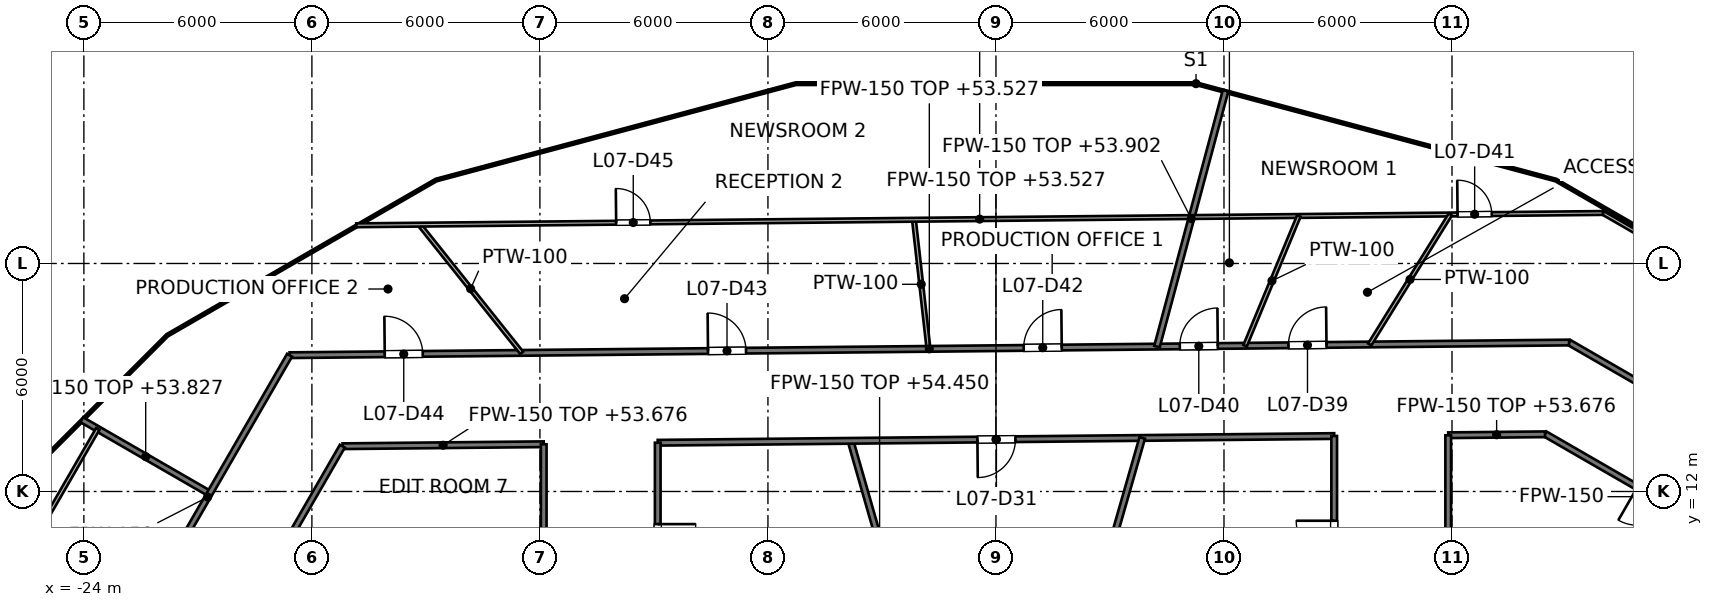
"""IFC4 building model, lengths in metres.
Left out: names, types, materials, properties, quantities, classifications, styles, units other than length and angle.
Written with IfcOpenShell. Run it as: python <this file> out.ifc"""

import sys

from ifc_helpers import new_model, si_unit, direction, frame, frame_2d, origin, place, context, subcontext, project, spatial, rectangle, extrude, element, fill, save


model = new_model("IFC4")
c1 = context("Model", 3, precision=1e-05, world=origin(), true_north=direction((0.0, 1.0)))
c2 = subcontext(c1, "Body", "Model", "MODEL_VIEW")
j1 = project(units=[si_unit("LENGTHUNIT", "METRE"), si_unit("PLANEANGLEUNIT", "RADIAN")], contexts=[c1])
p1 = place(None, origin())
s1 = spatial("IfcSite", under=j1, at=p1, CompositionType="ELEMENT")
p2 = place(p1, origin())
s2 = spatial("IfcBuilding", under=s1, at=p2, CompositionType="ELEMENT")
p3 = place(p2, frame((0.0, 0.0, 50.4)))
s3 = spatial("IfcBuildingStorey", under=s2, at=p3, CompositionType="ELEMENT", Elevation=50.4)
p4 = place(p3, frame((-3.827, 13.333, 0.0), z_axis=(0.0, 0.0, 1.0), x_axis=(0.275935525478, -0.961176147113, 0.0)))
e1 = element("IfcWall", 1, at=p4, inside=s3, PredefinedType="PARTITIONING", context=c2, shape_type="SweptSolid", body=[
    extrude(rectangle(XDim=5.548, YDim=0.15, at=frame_2d((2.774, 0.0))), origin(), (0.0, 0.0, 1.0), 4.05),
])
p5 = place(p3, frame((-24.056, 13.889, 0.0), z_axis=(0.0, 0.0, 1.0), x_axis=(0.865926134655, -0.500171899772, 0.0)))
e2 = element("IfcWall", 2, at=p5, inside=s3, PredefinedType="PARTITIONING", context=c2, shape_type="SweptSolid", body=[
    extrude(rectangle(XDim=3.887, YDim=0.15, at=frame_2d((1.943, 0.0))), origin(), (0.0, 0.0, 1.0), 3.427),
])
p6 = place(p3, frame((14.448, 13.515, 0.0), z_axis=(0.0, 0.0, 1.0), x_axis=(0.86594975937, -0.500130997087, 0.0)))
e3 = element("IfcWall", 3, at=p6, inside=s3, PredefinedType="PARTITIONING", context=c2, shape_type="SweptSolid", body=[
    extrude(rectangle(XDim=6.604, YDim=0.15, at=frame_2d((3.302, 0.0))), origin(), (0.0, 0.0, 1.0), 3.195),
])
p7 = place(p6, frame((2.805, 0.0, 0.0)))
e4 = element("IfcOpeningElement", 4, at=p7, cuts=e3, PredefinedType="OPENING", context=c2, shape_type="SweptSolid", body=[
    extrude(rectangle(XDim=1.0, YDim=2.1, at=frame_2d((0.5, 1.05))), frame((0.0, 0.075, 0.0), z_axis=(0.0, -1.0, 0.0), x_axis=(1.0, 0.0, 0.0)), (0.0, 0.0, 1.0), 0.15),
])
p8 = place(p3, frame((15.08, 15.921, 0.0), z_axis=(0.0, 0.0, 1.0), x_axis=(0.865938192663, -0.500151023679, 0.0)))
e5 = element("IfcWall", 5, at=p8, inside=s3, PredefinedType="PARTITIONING", context=c2, shape_type="SweptSolid", body=[
    extrude(rectangle(XDim=8.613, YDim=0.15, at=frame_2d((4.306, 0.0))), origin(), (0.0, 0.0, 1.0), 3.195),
])
p9 = place(p8, frame((3.21, 0.0, 0.0)))
e6 = element("IfcOpeningElement", 6, at=p9, cuts=e5, PredefinedType="OPENING", context=c2, shape_type="SweptSolid", body=[
    extrude(rectangle(XDim=1.2, YDim=2.1, at=frame_2d((0.6, 1.05))), frame((0.0, 0.075, 0.0), z_axis=(0.0, -1.0, 0.0), x_axis=(1.0, 0.0, 0.0)), (0.0, 0.0, 1.0), 0.15),
])
p10 = place(p3, frame((-17.194, 13.191, 0.0), z_axis=(0.0, 0.0, 1.0), x_axis=(0.999950853109, 0.009914200296, 0.0)))
e7 = element("IfcWall", 7, at=p10, inside=s3, PredefinedType="PARTITIONING", context=c2, shape_type="SweptSolid", body=[
    extrude(rectangle(XDim=5.294, YDim=0.15, at=frame_2d((2.647, 0.0))), origin(), (0.0, 0.0, 1.0), 3.276),
])
p11 = place(p3, frame((-8.9, 13.282, 0.0), z_axis=(0.0, 0.0, 1.0), x_axis=(0.999950834077, 0.009916119672, 0.0)))
e8 = element("IfcWall", 8, at=p11, inside=s3, PredefinedType="PARTITIONING", context=c2, shape_type="SweptSolid", body=[
    extrude(rectangle(XDim=17.801, YDim=0.15, at=frame_2d((8.9, 0.0))), origin(), (0.0, 0.0, 1.0), 3.127),
])
p12 = place(p11, frame((8.412, 0.0, 0.0)))
e9 = element("IfcOpeningElement", 9, at=p12, cuts=e8, PredefinedType="OPENING", context=c2, shape_type="SweptSolid", body=[
    extrude(rectangle(XDim=1.0, YDim=2.1, at=frame_2d((0.5, 1.05))), frame((0.0, 0.075, 0.0), z_axis=(0.0, -1.0, 0.0), x_axis=(1.0, 0.0, 0.0)), (0.0, 0.0, 1.0), 0.15),
])
p13 = place(p3, frame((11.9, 13.48, 0.0), z_axis=(0.0, 0.0, 1.0), x_axis=(0.999950357576, 0.009964054536, 0.0)))
e10 = element("IfcWall", 10, at=p13, inside=s3, PredefinedType="PARTITIONING", context=c2, shape_type="SweptSolid", body=[
    extrude(rectangle(XDim=2.548, YDim=0.15, at=frame_2d((1.274, 0.0))), origin(), (0.0, 0.0, 1.0), 3.276),
])
p14 = place(p3, frame((-18.587, 15.586, 0.0), z_axis=(0.0, 0.0, 1.0), x_axis=(0.99995087003, 0.009912493396, 0.0)))
e11 = element("IfcWall", 11, at=p14, inside=s3, PredefinedType="PARTITIONING", context=c2, shape_type="SweptSolid", body=[
    extrude(rectangle(XDim=33.669, YDim=0.15, at=frame_2d((16.834, 0.0))), origin(), (0.0, 0.0, 1.0), 3.127),
])
p15 = place(p14, frame((26.285, 0.0, 0.0)))
e12 = element("IfcOpeningElement", 12, at=p15, cuts=e11, PredefinedType="OPENING", context=c2, shape_type="SweptSolid", body=[
    extrude(rectangle(XDim=1.0, YDim=2.1, at=frame_2d((0.5, 1.05))), frame((0.0, 0.075, 0.0), z_axis=(0.0, -1.0, 0.0), x_axis=(1.0, 0.0, 0.0)), (0.0, 0.0, 1.0), 0.15),
])
p16 = place(p14, frame((23.425, 0.0, 0.0)))
e13 = element("IfcOpeningElement", 13, at=p16, cuts=e11, PredefinedType="OPENING", context=c2, shape_type="SweptSolid", body=[
    extrude(rectangle(XDim=1.0, YDim=2.1, at=frame_2d((0.5, 1.05))), frame((0.0, 0.075, 0.0), z_axis=(0.0, -1.0, 0.0), x_axis=(1.0, 0.0, 0.0)), (0.0, 0.0, 1.0), 0.15),
])
p17 = place(p14, frame((19.319, 0.0, 0.0)))
e14 = element("IfcOpeningElement", 14, at=p17, cuts=e11, PredefinedType="OPENING", context=c2, shape_type="SweptSolid", body=[
    extrude(rectangle(XDim=1.0, YDim=2.1, at=frame_2d((0.5, 1.05))), frame((0.0, 0.075, 0.0), z_axis=(0.0, -1.0, 0.0), x_axis=(1.0, 0.0, 0.0)), (0.0, 0.0, 1.0), 0.15),
])
p18 = place(p14, frame((11.01, 0.0, 0.0)))
e15 = element("IfcOpeningElement", 15, at=p18, cuts=e11, PredefinedType="OPENING", context=c2, shape_type="SweptSolid", body=[
    extrude(rectangle(XDim=1.0, YDim=2.1, at=frame_2d((0.5, 1.05))), frame((0.0, 0.075, 0.0), z_axis=(0.0, -1.0, 0.0), x_axis=(1.0, 0.0, 0.0)), (0.0, 0.0, 1.0), 0.15),
])
p19 = place(p14, frame((2.504, 0.0, 0.0)))
e16 = element("IfcOpeningElement", 16, at=p19, cuts=e11, PredefinedType="OPENING", context=c2, shape_type="SweptSolid", body=[
    extrude(rectangle(XDim=1.0, YDim=2.1, at=frame_2d((0.5, 1.05))), frame((0.0, 0.075, 0.0), z_axis=(0.0, -1.0, 0.0), x_axis=(1.0, 0.0, 0.0)), (0.0, 0.0, 1.0), 0.15),
])
p20 = place(p3, frame((-20.5, 7.474, 0.0), z_axis=(0.0, 0.0, 1.0), x_axis=(0.500012665616, 0.866018091164, 0.0)))
e17 = element("IfcWall", 17, at=p20, inside=s3, PredefinedType="PARTITIONING", context=c2, shape_type="SweptSolid", body=[
    extrude(rectangle(XDim=6.602, YDim=0.15, at=frame_2d((3.301, 0.0))), origin(), (0.0, 0.0, 1.0), 3.195),
])
p21 = place(p20, frame((2.803, 0.0, 0.0)))
e18 = element("IfcOpeningElement", 18, at=p21, cuts=e17, PredefinedType="OPENING", context=c2, shape_type="SweptSolid", body=[
    extrude(rectangle(XDim=1.0, YDim=2.1, at=frame_2d((0.5, 1.05))), frame((0.0, 0.075, 0.0), z_axis=(0.0, -1.0, 0.0), x_axis=(1.0, 0.0, 0.0)), (0.0, 0.0, 1.0), 0.15),
])
p22 = place(p3, frame((-22.9, 8.117, 0.0), z_axis=(0.0, 0.0, 1.0), x_axis=(0.5000050195, 0.866022505755, 0.0)))
e19 = element("IfcWall", 19, at=p22, inside=s3, PredefinedType="PARTITIONING", context=c2, shape_type="SweptSolid", body=[
    extrude(rectangle(XDim=8.626, YDim=0.15, at=frame_2d((4.313, 0.0))), origin(), (0.0, 0.0, 1.0), 3.195),
])
p23 = place(p3, frame((2.296, 8.0, 0.0), z_axis=(0.0, 0.0, 1.0), x_axis=(0.275958345059, 0.961169595749, 0.0)))
e20 = element("IfcWall", 20, at=p23, inside=s3, PredefinedType="PARTITIONING", context=c2, shape_type="SweptSolid", body=[
    extrude(rectangle(XDim=5.628, YDim=0.15, at=frame_2d((2.814, 0.0))), origin(), (0.0, 0.0, 1.0), 4.05),
])
p24 = place(p3, frame((4.237, 15.813, 0.0), z_axis=(0.0, 0.0, 1.0), x_axis=(0.25883764095, 0.965920843355, 0.0)))
e21 = element("IfcWall", 21, at=p24, inside=s3, PredefinedType="PARTITIONING", context=c2, shape_type="SweptSolid", body=[
    extrude(rectangle(XDim=6.969, YDim=0.15, at=frame_2d((3.485, 0.0))), origin(), (0.0, 0.0, 1.0), 3.502),
])
p25 = place(p3, frame((11.9, 8.0, 0.0), z_axis=(0.0, 0.0, 1.0), x_axis=(0.0, 1.0, 0.0)))
e22 = element("IfcWall", 22, at=p25, inside=s3, PredefinedType="PARTITIONING", context=c2, shape_type="SweptSolid", body=[
    extrude(rectangle(XDim=5.479, YDim=0.15, at=frame_2d((2.74, 0.0))), origin(), (0.0, 0.0, 1.0), 3.195),
])
p26 = place(p3, frame((8.9, 8.0, 0.0), z_axis=(0.0, 0.0, 1.0), x_axis=(0.0, 1.0, 0.0)))
e23 = element("IfcWall", 23, at=p26, inside=s3, PredefinedType="PARTITIONING", context=c2, shape_type="SweptSolid", body=[
    extrude(rectangle(XDim=5.46, YDim=0.15, at=frame_2d((2.73, 0.0))), origin(), (0.0, 0.0, 1.0), 3.127),
])
p27 = place(p26, frame((2.23, 0.0, 0.0)))
e24 = element("IfcOpeningElement", 24, at=p27, cuts=e23, PredefinedType="OPENING", context=c2, shape_type="SweptSolid", body=[
    extrude(rectangle(XDim=1.0, YDim=2.1, at=frame_2d((0.5, 1.05))), frame((0.0, 0.075, 0.0), z_axis=(0.0, -1.0, 0.0), x_axis=(1.0, 0.0, 0.0)), (0.0, 0.0, 1.0), 0.15),
])
p28 = place(p3, frame((-8.9, 8.0, 0.0), z_axis=(0.0, 0.0, 1.0), x_axis=(0.0, 1.0, 0.0)))
e25 = element("IfcWall", 25, at=p28, inside=s3, PredefinedType="PARTITIONING", context=c2, shape_type="SweptSolid", body=[
    extrude(rectangle(XDim=5.283, YDim=0.15, at=frame_2d((2.642, 0.0))), origin(), (0.0, 0.0, 1.0), 3.127),
])
p29 = place(p28, frame((2.142, 0.0, 0.0)))
e26 = element("IfcOpeningElement", 26, at=p29, cuts=e25, PredefinedType="OPENING", context=c2, shape_type="SweptSolid", body=[
    extrude(rectangle(XDim=1.0, YDim=2.1, at=frame_2d((0.5, 1.05))), frame((0.0, 0.075, 0.0), z_axis=(0.0, -1.0, 0.0), x_axis=(1.0, 0.0, 0.0)), (0.0, 0.0, 1.0), 0.15),
])
p30 = place(p3, frame((-11.9, 8.0, 0.0), z_axis=(0.0, 0.0, 1.0), x_axis=(0.0, 1.0, 0.0)))
e27 = element("IfcWall", 27, at=p30, inside=s3, PredefinedType="PARTITIONING", context=c2, shape_type="SweptSolid", body=[
    extrude(rectangle(XDim=5.243, YDim=0.15, at=frame_2d((2.622, 0.0))), origin(), (0.0, 0.0, 1.0), 3.195),
])
p31 = place(p3, frame((-2.158, 19.151, 0.0), z_axis=(0.0, 0.0, 1.0), x_axis=(0.11205394809, -0.993702124742, 0.0)))
e28 = element("IfcWall", 28, at=p31, inside=s3, PredefinedType="PARTITIONING", context=c2, shape_type="SweptSolid", body=[
    extrude(rectangle(XDim=3.418, YDim=0.1, at=frame_2d((1.709, 0.0))), origin(), (0.0, 0.0, 1.0), 4.05),
])
p32 = place(p3, frame((-15.169, 19.021, 0.0), z_axis=(0.0, 0.0, 1.0), x_axis=(0.623493525826, -0.781828512689, 0.0)))
e29 = element("IfcWall", 29, at=p32, inside=s3, PredefinedType="PARTITIONING", context=c2, shape_type="SweptSolid", body=[
    extrude(rectangle(XDim=4.314, YDim=0.1, at=frame_2d((2.157, 0.0))), origin(), (0.0, 0.0, 1.0), 4.05),
])
p33 = place(p3, frame((15.975, 19.33, 0.0), z_axis=(0.0, 0.0, 1.0), x_axis=(0.866055347786, -0.499948131882, 0.0)))
e30 = element("IfcWall", 30, at=p33, inside=s3, PredefinedType="PARTITIONING", context=c2, shape_type="SweptSolid", body=[
    extrude(rectangle(XDim=7.211, YDim=0.1, at=frame_2d((3.605, 0.0))), origin(), (0.0, 0.0, 1.0), 3.195),
])
p34 = place(p3, frame((-16.833, 19.005, 0.0), z_axis=(0.0, 0.0, 1.0), x_axis=(0.999951173888, 0.009881793387, 0.0)))
e31 = element("IfcWall", 31, at=p34, inside=s3, PredefinedType="PARTITIONING", context=c2, shape_type="SweptSolid", body=[
    extrude(rectangle(XDim=32.81, YDim=0.1, at=frame_2d((16.405, 0.0))), origin(), (0.0, 0.0, 1.0), 3.127),
])
p35 = place(p34, frame((28.98, 0.0, 0.0)))
e32 = element("IfcOpeningElement", 32, at=p35, cuts=e31, PredefinedType="OPENING", context=c2, shape_type="SweptSolid", body=[
    extrude(rectangle(XDim=0.9, YDim=2.1, at=frame_2d((0.45, 1.05))), frame((0.0, 0.05, 0.0), z_axis=(0.0, -1.0, 0.0), x_axis=(1.0, 0.0, 0.0)), (0.0, 0.0, 1.0), 0.1),
])
p36 = place(p34, frame((6.84, 0.0, 0.0)))
e33 = element("IfcOpeningElement", 33, at=p36, cuts=e31, PredefinedType="OPENING", context=c2, shape_type="SweptSolid", body=[
    extrude(rectangle(XDim=0.9, YDim=2.1, at=frame_2d((0.45, 1.05))), frame((0.0, 0.05, 0.0), z_axis=(0.0, -1.0, 0.0), x_axis=(1.0, 0.0, 0.0)), (0.0, 0.0, 1.0), 0.1),
])
p37 = place(p3, frame((9.834, 15.869, 0.0), z_axis=(0.0, 0.0, 1.0), x_axis=(0.526937040235, 0.849904321456, 0.0)))
e34 = element("IfcWall", 34, at=p37, inside=s3, PredefinedType="PARTITIONING", context=c2, shape_type="SweptSolid", body=[
    extrude(rectangle(XDim=4.025, YDim=0.1, at=frame_2d((2.013, 0.0))), origin(), (0.0, 0.0, 1.0), 4.05),
])
p38 = place(p3, frame((-26.3, 9.028, 0.0), z_axis=(0.0, 0.0, 1.0), x_axis=(0.500059382915, 0.865991116328, 0.0)))
e35 = element("IfcWall", 35, at=p38, inside=s3, PredefinedType="PARTITIONING", context=c2, shape_type="SweptSolid", body=[
    extrude(rectangle(XDim=5.331, YDim=0.1, at=frame_2d((2.666, 0.0))), origin(), (0.0, 0.0, 1.0), 3.276),
])
p39 = place(p3, frame((6.556, 15.836, 0.0), z_axis=(0.0, 0.0, 1.0), x_axis=(0.38256958401, 0.923926681826, 0.0)))
e36 = element("IfcWall", 36, at=p39, inside=s3, PredefinedType="PARTITIONING", context=c2, shape_type="SweptSolid", body=[
    extrude(rectangle(XDim=3.696, YDim=0.1, at=frame_2d((1.848, 0.0))), origin(), (0.0, 0.0, 1.0), 4.05),
])
p40 = place(p27, origin())
e37 = element("IfcDoor", 37, at=p40, inside=s3, OperationType="SINGLE_SWING_RIGHT", PredefinedType="DOOR", context=c2, shape_type="SweptSolid", body=[
    extrude(rectangle(XDim=1.0, YDim=2.1, at=frame_2d((0.5, 1.05))), frame((0.0, 0.025, 0.0), z_axis=(0.0, -1.0, 0.0), x_axis=(1.0, 0.0, 0.0)), (0.0, 0.0, 1.0), 0.05),
])
fill(e24, e37)
p41 = place(p12, origin())
e38 = element("IfcDoor", 38, at=p41, inside=s3, OperationType="SINGLE_SWING_LEFT", PredefinedType="DOOR", context=c2, shape_type="SweptSolid", body=[
    extrude(rectangle(XDim=1.0, YDim=2.1, at=frame_2d((0.5, 1.05))), frame((0.0, 0.025, 0.0), z_axis=(0.0, -1.0, 0.0), x_axis=(1.0, 0.0, 0.0)), (0.0, 0.0, 1.0), 0.05),
])
fill(e9, e38)
p42 = place(p29, origin())
e39 = element("IfcDoor", 39, at=p42, inside=s3, OperationType="SINGLE_SWING_RIGHT", PredefinedType="DOOR", context=c2, shape_type="SweptSolid", body=[
    extrude(rectangle(XDim=1.0, YDim=2.1, at=frame_2d((0.5, 1.05))), frame((0.0, 0.025, 0.0), z_axis=(0.0, -1.0, 0.0), x_axis=(1.0, 0.0, 0.0)), (0.0, 0.0, 1.0), 0.05),
])
fill(e26, e39)
p43 = place(p15, origin())
e40 = element("IfcDoor", 40, at=p43, inside=s3, OperationType="SINGLE_SWING_RIGHT", PredefinedType="DOOR", context=c2, shape_type="SweptSolid", body=[
    extrude(rectangle(XDim=1.0, YDim=2.1, at=frame_2d((0.5, 1.05))), frame((0.0, 0.025, 0.0), z_axis=(0.0, -1.0, 0.0), x_axis=(1.0, 0.0, 0.0)), (0.0, 0.0, 1.0), 0.05),
])
fill(e12, e40)
p44 = place(p16, origin())
e41 = element("IfcDoor", 41, at=p44, inside=s3, OperationType="SINGLE_SWING_RIGHT", PredefinedType="DOOR", context=c2, shape_type="SweptSolid", body=[
    extrude(rectangle(XDim=1.0, YDim=2.1, at=frame_2d((0.5, 1.05))), frame((0.0, 0.025, 0.0), z_axis=(0.0, -1.0, 0.0), x_axis=(1.0, 0.0, 0.0)), (0.0, 0.0, 1.0), 0.05),
])
fill(e13, e41)
p45 = place(p35, origin())
e42 = element("IfcDoor", 42, at=p45, inside=s3, OperationType="SINGLE_SWING_LEFT", PredefinedType="DOOR", context=c2, shape_type="SweptSolid", body=[
    extrude(rectangle(XDim=0.9, YDim=2.1, at=frame_2d((0.45, 1.05))), frame((0.0, 0.025, 0.0), z_axis=(0.0, -1.0, 0.0), x_axis=(1.0, 0.0, 0.0)), (0.0, 0.0, 1.0), 0.05),
])
fill(e32, e42)
p46 = place(p17, origin())
e43 = element("IfcDoor", 43, at=p46, inside=s3, OperationType="SINGLE_SWING_RIGHT", PredefinedType="DOOR", context=c2, shape_type="SweptSolid", body=[
    extrude(rectangle(XDim=1.0, YDim=2.1, at=frame_2d((0.5, 1.05))), frame((0.0, 0.025, 0.0), z_axis=(0.0, -1.0, 0.0), x_axis=(1.0, 0.0, 0.0)), (0.0, 0.0, 1.0), 0.05),
])
fill(e14, e43)
p47 = place(p18, origin())
e44 = element("IfcDoor", 44, at=p47, inside=s3, OperationType="SINGLE_SWING_LEFT", PredefinedType="DOOR", context=c2, shape_type="SweptSolid", body=[
    extrude(rectangle(XDim=1.0, YDim=2.1, at=frame_2d((0.5, 1.05))), frame((0.0, 0.025, 0.0), z_axis=(0.0, -1.0, 0.0), x_axis=(1.0, 0.0, 0.0)), (0.0, 0.0, 1.0), 0.05),
])
fill(e15, e44)
p48 = place(p19, origin())
e45 = element("IfcDoor", 45, at=p48, inside=s3, OperationType="SINGLE_SWING_LEFT", PredefinedType="DOOR", context=c2, shape_type="SweptSolid", body=[
    extrude(rectangle(XDim=1.0, YDim=2.1, at=frame_2d((0.5, 1.05))), frame((0.0, 0.025, 0.0), z_axis=(0.0, -1.0, 0.0), x_axis=(1.0, 0.0, 0.0)), (0.0, 0.0, 1.0), 0.05),
])
fill(e16, e45)
p49 = place(p36, origin())
e46 = element("IfcDoor", 46, at=p49, inside=s3, OperationType="SINGLE_SWING_LEFT", PredefinedType="DOOR", context=c2, shape_type="SweptSolid", body=[
    extrude(rectangle(XDim=0.9, YDim=2.1, at=frame_2d((0.45, 1.05))), frame((0.0, 0.025, 0.0), z_axis=(0.0, -1.0, 0.0), x_axis=(1.0, 0.0, 0.0)), (0.0, 0.0, 1.0), 0.05),
])
fill(e33, e46)
save(model, sys.argv[1])
